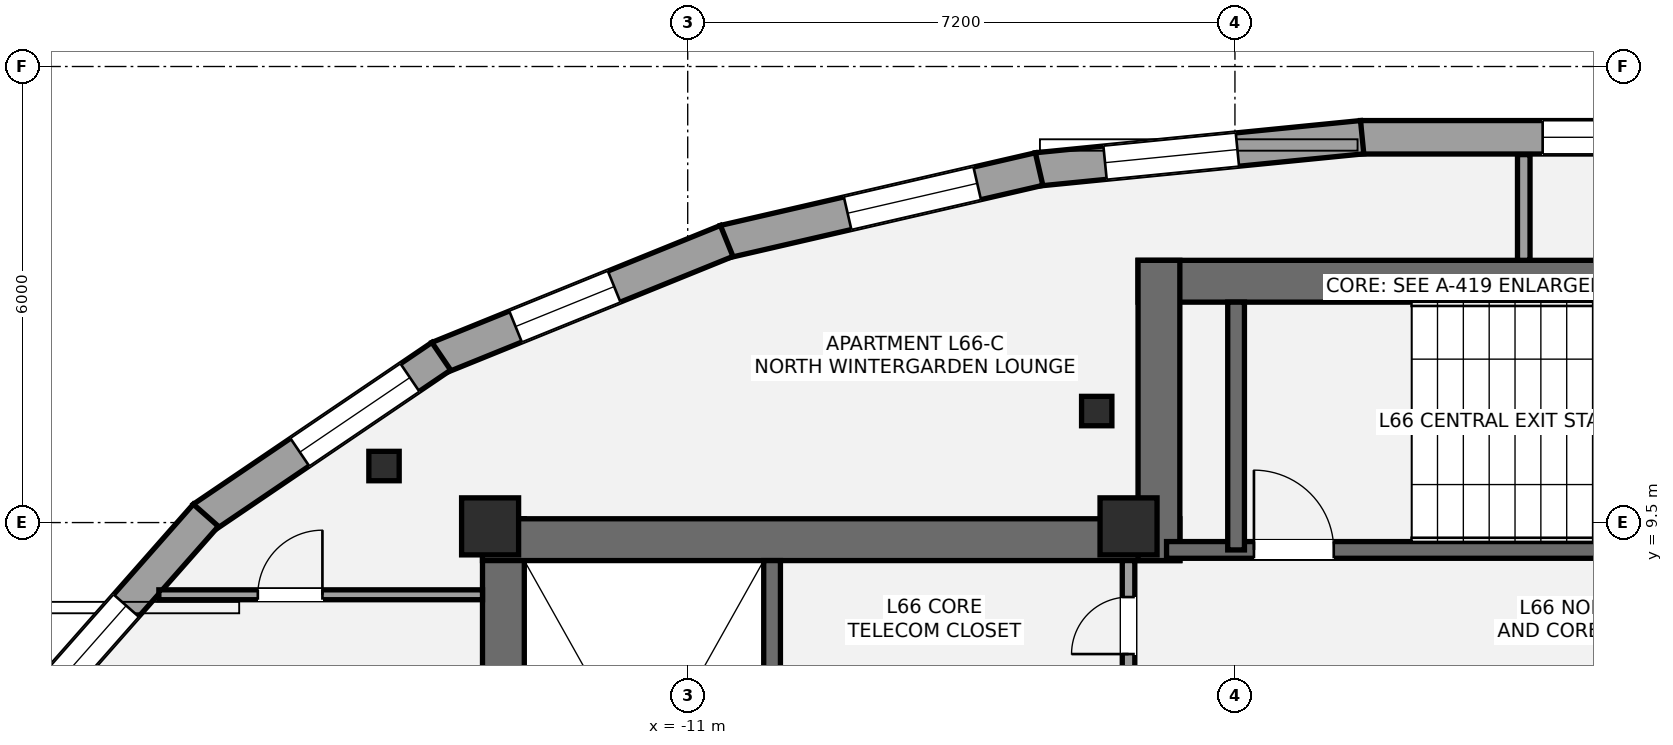
"""IFC4 building model, lengths in metres.
Left out: names, types, materials, properties, quantities, classifications, styles, units other than length and angle.
Written with IfcOpenShell. Run it as: python <this file> out.ifc"""

import sys

from ifc_helpers import new_model, si_unit, direction, frame, frame_2d, origin, origin_2d, place, context, subcontext, project, spatial, rectangle, i_section, extrude, element, fill, save


model = new_model("IFC4")
c1 = context("Model", 3, precision=1e-05, world=origin(), true_north=direction((0.0, 1.0)))
c2 = subcontext(c1, "Body", "Model", "MODEL_VIEW")
j1 = project(units=[si_unit("LENGTHUNIT", "METRE"), si_unit("PLANEANGLEUNIT", "RADIAN")], contexts=[c1])
p1 = place(None, origin())
s1 = spatial("IfcSite", under=j1, at=p1, CompositionType="ELEMENT")
p2 = place(p1, origin())
s2 = spatial("IfcBuilding", under=s1, at=p2, CompositionType="ELEMENT")
p3 = place(p2, frame((0.0, 0.0, 235.2)))
s3 = spatial("IfcBuildingStorey", under=s2, at=p3, CompositionType="ELEMENT", Elevation=235.2)
p4 = place(p3, frame((-13.425, 1.3, 0.0), z_axis=(0.0, 0.0, 1.0), x_axis=(0.0, 1.0, 0.0)))
e1 = element("IfcWall", 1, at=p4, inside=s3, PredefinedType="SHEAR", context=c2, shape_type="SweptSolid", body=[
    extrude(rectangle(XDim=8.25, YDim=0.55, at=frame_2d((4.125, 0.0))), origin(), (0.0, 0.0, 1.0), 3.15),
])
p5 = place(p3, frame((-13.7, 9.275, 0.0), z_axis=(0.0, 0.0, 1.0), x_axis=(1.0, 0.0, 0.0)))
e2 = element("IfcWall", 2, at=p5, inside=s3, PredefinedType="SHEAR", context=c2, shape_type="SweptSolid", body=[
    extrude(rectangle(XDim=9.175, YDim=0.55, at=frame_2d((4.587, 0.0))), origin(), (0.0, 0.0, 1.0), 3.15),
])
p6 = place(p3, frame((-9.89, 1.85, 0.0), z_axis=(0.0, 0.0, 1.0), x_axis=(0.0, 1.0, 0.0)))
e3 = element("IfcWall", 3, at=p6, inside=s3, PredefinedType="SHEAR", context=c2, shape_type="SweptSolid", body=[
    extrude(rectangle(XDim=7.15, YDim=0.22, at=frame_2d((3.575, 0.0))), origin(), (0.0, 0.0, 1.0), 3.15),
])
p7 = place(p3, frame((-5.075, 12.675, 0.0), z_axis=(0.0, 0.0, 1.0), x_axis=(1.0, 0.0, 0.0)))
e4 = element("IfcWall", 4, at=p7, inside=s3, PredefinedType="SHEAR", context=c2, shape_type="SweptSolid", body=[
    extrude(rectangle(XDim=10.15, YDim=0.55, at=frame_2d((5.075, 0.0))), origin(), (0.0, 0.0, 1.0), 3.15),
])
p8 = place(p3, frame((-4.8, 9.0, 0.0), z_axis=(0.0, 0.0, 1.0), x_axis=(0.0, 1.0, 0.0)))
e5 = element("IfcWall", 5, at=p8, inside=s3, PredefinedType="SHEAR", context=c2, shape_type="SweptSolid", body=[
    extrude(rectangle(XDim=3.95, YDim=0.55, at=frame_2d((1.975, 0.0))), origin(), (0.0, 0.0, 1.0), 3.15),
])
p9 = place(p3, frame((-4.7, 9.14, 0.0), z_axis=(0.0, 0.0, 1.0), x_axis=(1.0, 0.0, 0.0)))
e6 = element("IfcWall", 6, at=p9, inside=s3, PredefinedType="SHEAR", context=c2, shape_type="SweptSolid", body=[
    extrude(rectangle(XDim=9.3, YDim=0.22, at=frame_2d((4.65, 0.0))), origin(), (0.0, 0.0, 1.0), 3.15),
])
p10 = place(p9, frame((1.15, 0.0, 0.0)))
e7 = element("IfcOpeningElement", 7, at=p10, cuts=e6, PredefinedType="OPENING", context=c2, shape_type="SweptSolid", body=[
    extrude(rectangle(XDim=1.05, YDim=2.15, at=frame_2d((0.525, 1.075))), frame((0.0, 0.12, 0.0), z_axis=(0.0, -1.0, 0.0), x_axis=(1.0, 0.0, 0.0)), (0.0, 0.0, 1.0), 0.24),
])
p11 = place(p3, frame((-3.785, 9.14, 0.0), z_axis=(0.0, 0.0, 1.0), x_axis=(0.0, 1.0, 0.0)))
e8 = element("IfcWall", 8, at=p11, inside=s3, PredefinedType="SHEAR", context=c2, shape_type="SweptSolid", body=[
    extrude(rectangle(XDim=3.26, YDim=0.22, at=frame_2d((1.63, 0.0))), origin(), (0.0, 0.0, 1.0), 3.15),
])
for number, where, z_axis, x_axis in (
    (9, (-13.6, 9.45, 0.0), (0.0, 0.0, 1.0), (1.0, 0.0, 0.0)),
    (10, (-5.2, 9.45, 0.0), (0.0, 0.0, 1.0), (1.0, 0.0, 0.0)),
):
    element("IfcColumn", number, at=place(p3, frame(where, z_axis=z_axis, x_axis=x_axis)), inside=s3, PredefinedType="PILASTER", context=c2, shape_type="SweptSolid", body=[
        extrude(rectangle(XDim=0.75, YDim=0.75, at=origin_2d()), origin(), (0.0, 0.0, 1.0), 3.15),
    ])
for number, where, z_axis, x_axis in (
    (11, (-5.619, 10.967, 0.0), (0.0, 0.0, 1.0), (1.0, 0.0, 0.0)),
    (12, (-14.996, 10.244, 0.0), (0.0, 0.0, 1.0), (1.0, 0.0, 0.0)),
):
    element("IfcColumn", number, at=place(p3, frame(where, z_axis=z_axis, x_axis=x_axis)), inside=s3, PredefinedType="COLUMN", context=c2, shape_type="SweptSolid", body=[
        extrude(i_section(OverallWidth=0.399, OverallDepth=0.387, WebThickness=0.021, FlangeThickness=0.033, at=origin_2d()), origin(), (0.0, 0.0, 1.0), 3.15),
    ])
p12 = place(p3, frame((-2.148, 14.569, 0.0), z_axis=(0.0, 0.0, 1.0), x_axis=(1.0, 0.0, 0.0)))
e13 = element("IfcWall", 13, at=p12, inside=s3, PredefinedType="STANDARD", context=c2, shape_type="SweptSolid", body=[
    extrude(rectangle(XDim=4.296, YDim=0.44, at=frame_2d((2.148, 0.0))), origin(), (0.0, 0.0, 1.0), 2.336),
])
p13 = place(p12, frame((2.396, 0.0, 0.58)))
e14 = element("IfcOpeningElement", 14, at=p13, cuts=e13, PredefinedType="OPENING", context=c2, shape_type="SweptSolid", body=[
    extrude(rectangle(XDim=1.4, YDim=1.55, at=frame_2d((0.7, 0.775))), frame((0.0, 0.23, 0.0), z_axis=(0.0, -1.0, 0.0), x_axis=(1.0, 0.0, 0.0)), (0.0, 0.0, 1.0), 0.46),
])
p14 = place(p3, frame((-6.405, 14.146, 0.0), z_axis=(0.0, 0.0, 1.0), x_axis=(0.995134540264, 0.098525361068, 0.0)))
e15 = element("IfcWall", 15, at=p14, inside=s3, PredefinedType="STANDARD", context=c2, shape_type="SweptSolid", body=[
    extrude(rectangle(XDim=4.299, YDim=0.44, at=frame_2d((2.15, 0.0))), origin(), (0.0, 0.0, 1.0), 2.336),
])
p15 = place(p14, frame((0.9, 0.0, 0.55)))
e16 = element("IfcOpeningElement", 16, at=p15, cuts=e15, PredefinedType="OPENING", context=c2, shape_type="SweptSolid", body=[
    extrude(rectangle(XDim=1.75, YDim=1.55, at=frame_2d((0.875, 0.775))), frame((0.0, 0.23, 0.0), z_axis=(0.0, -1.0, 0.0), x_axis=(1.0, 0.0, 0.0)), (0.0, 0.0, 1.0), 0.46),
])
p16 = place(p3, frame((-10.52, 13.195, 0.0), z_axis=(0.0, 0.0, 1.0), x_axis=(0.974398936081, 0.224825962391, 0.0)))
e17 = element("IfcWall", 17, at=p16, inside=s3, PredefinedType="STANDARD", context=c2, shape_type="SweptSolid", body=[
    extrude(rectangle(XDim=4.252, YDim=0.44, at=frame_2d((2.126, 0.0))), origin(), (0.0, 0.0, 1.0), 2.336),
])
p17 = place(p16, frame((1.667, 0.0, 0.55)))
e18 = element("IfcOpeningElement", 18, at=p17, cuts=e17, PredefinedType="OPENING", context=c2, shape_type="SweptSolid", body=[
    extrude(rectangle(XDim=1.75, YDim=1.55, at=frame_2d((0.875, 0.775))), frame((0.0, 0.23, 0.0), z_axis=(0.0, -1.0, 0.0), x_axis=(1.0, 0.0, 0.0)), (0.0, 0.0, 1.0), 0.46),
])
p18 = place(p3, frame((-14.283, 11.666, 0.0), z_axis=(0.0, 0.0, 1.0), x_axis=(0.926731976866, 0.375723093586, 0.0)))
e19 = element("IfcWall", 19, at=p18, inside=s3, PredefinedType="STANDARD", context=c2, shape_type="SweptSolid", body=[
    extrude(rectangle(XDim=4.096, YDim=0.44, at=frame_2d((2.048, 0.0))), origin(), (0.0, 0.0, 1.0), 2.336),
])
p19 = place(p18, frame((1.098, 0.0, 0.55)))
e20 = element("IfcOpeningElement", 20, at=p19, cuts=e19, PredefinedType="OPENING", context=c2, shape_type="SweptSolid", body=[
    extrude(rectangle(XDim=1.4, YDim=1.55, at=frame_2d((0.7, 0.775))), frame((0.0, 0.23, 0.0), z_axis=(0.0, -1.0, 0.0), x_axis=(1.0, 0.0, 0.0)), (0.0, 0.0, 1.0), 0.46),
])
p20 = place(p3, frame((-17.381, 9.559, 0.0), z_axis=(0.0, 0.0, 1.0), x_axis=(0.827637036896, 0.561263694851, 0.0)))
e21 = element("IfcWall", 21, at=p20, inside=s3, PredefinedType="STANDARD", context=c2, shape_type="SweptSolid", body=[
    extrude(rectangle(XDim=3.793, YDim=0.44, at=frame_2d((1.896, 0.0))), origin(), (0.0, 0.0, 1.0), 2.336),
])
p21 = place(p20, frame((1.544, 0.0, 0.55)))
e22 = element("IfcOpeningElement", 22, at=p21, cuts=e21, PredefinedType="OPENING", context=c2, shape_type="SweptSolid", body=[
    extrude(rectangle(XDim=1.75, YDim=1.55, at=frame_2d((0.875, 0.775))), frame((0.0, 0.23, 0.0), z_axis=(0.0, -1.0, 0.0), x_axis=(1.0, 0.0, 0.0)), (0.0, 0.0, 1.0), 0.46),
])
p22 = place(p3, frame((-19.61, 7.022, 0.0), z_axis=(0.0, 0.0, 1.0), x_axis=(0.66136043846, 0.750068243855, 0.0)))
e23 = element("IfcWall", 23, at=p22, inside=s3, PredefinedType="STANDARD", context=c2, shape_type="SweptSolid", body=[
    extrude(rectangle(XDim=3.432, YDim=0.44, at=frame_2d((1.716, 0.0))), origin(), (0.0, 0.0, 1.0), 2.336),
])
p23 = place(p22, frame((0.447, 0.0, 0.58)))
e24 = element("IfcOpeningElement", 24, at=p23, cuts=e23, PredefinedType="OPENING", context=c2, shape_type="SweptSolid", body=[
    extrude(rectangle(XDim=1.4, YDim=1.55, at=frame_2d((0.7, 0.775))), frame((0.0, 0.23, 0.0), z_axis=(0.0, -1.0, 0.0), x_axis=(1.0, 0.0, 0.0)), (0.0, 0.0, 1.0), 0.46),
])
p24 = place(p3, frame((-5.2, 7.42, 0.0), z_axis=(0.0, 0.0, 1.0), x_axis=(0.0, 1.0, 0.0)))
e25 = element("IfcWall", 25, at=p24, inside=s3, PredefinedType="PARTITIONING", context=c2, shape_type="SweptSolid", body=[
    extrude(rectangle(XDim=1.58, YDim=0.165, at=frame_2d((0.79, 0.0))), origin(), (0.0, 0.0, 1.0), 2.97),
])
p25 = place(p24, frame((0.35, 0.0, 0.0)))
e26 = element("IfcOpeningElement", 26, at=p25, cuts=e25, PredefinedType="OPENING", context=c2, shape_type="SweptSolid", body=[
    extrude(rectangle(XDim=0.75, YDim=2.1, at=frame_2d((0.375, 1.05))), frame((0.0, 0.093, 0.0), z_axis=(0.0, -1.0, 0.0), x_axis=(1.0, 0.0, 0.0)), (0.0, 0.0, 1.0), 0.185),
])
p26 = place(p3, frame((0.0, 12.95, 0.0), z_axis=(0.0, 0.0, 1.0), x_axis=(0.0, 1.0, 0.0)))
e27 = element("IfcWall", 27, at=p26, inside=s3, PredefinedType="PARTITIONING", context=c2, shape_type="SweptSolid", body=[
    extrude(rectangle(XDim=1.391, YDim=0.165, at=frame_2d((0.695, 0.0))), origin(), (0.0, 0.0, 1.0), 2.97),
])
p27 = place(p3, frame((-17.958, 8.55, 0.0), z_axis=(0.0, 0.0, 1.0), x_axis=(1.0, 0.0, 0.0)))
e28 = element("IfcWall", 28, at=p27, inside=s3, PredefinedType="PARTITIONING", context=c2, shape_type="SweptSolid", body=[
    extrude(rectangle(XDim=4.258, YDim=0.13, at=frame_2d((2.129, 0.0))), origin(), (0.0, 0.0, 1.0), 2.423),
])
p28 = place(p27, frame((1.302, 0.0, 0.0)))
e29 = element("IfcOpeningElement", 29, at=p28, cuts=e28, PredefinedType="OPENING", context=c2, shape_type="SweptSolid", body=[
    extrude(rectangle(XDim=0.85, YDim=2.1, at=frame_2d((0.425, 1.05))), frame((0.0, 0.075, 0.0), z_axis=(0.0, -1.0, 0.0), x_axis=(1.0, 0.0, 0.0)), (0.0, 0.0, 1.0), 0.15),
])
p29 = place(p13, origin())
e30 = element("IfcWindow", 30, at=p29, inside=s3, PartitioningType="SINGLE_PANEL", PredefinedType="WINDOW", context=c2, shape_type="SweptSolid", body=[
    extrude(rectangle(XDim=1.4, YDim=1.55, at=frame_2d((0.7, 0.775))), frame((0.0, -0.01, 0.0), z_axis=(0.0, -1.0, 0.0), x_axis=(1.0, 0.0, 0.0)), (0.0, 0.0, 1.0), 0.06),
])
fill(e14, e30)
p30 = place(p15, origin())
e31 = element("IfcWindow", 31, at=p30, inside=s3, PartitioningType="SINGLE_PANEL", PredefinedType="WINDOW", context=c2, shape_type="SweptSolid", body=[
    extrude(rectangle(XDim=1.75, YDim=1.55, at=frame_2d((0.875, 0.775))), frame((0.0, -0.01, 0.0), z_axis=(0.0, -1.0, 0.0), x_axis=(1.0, 0.0, 0.0)), (0.0, 0.0, 1.0), 0.06),
])
fill(e16, e31)
p31 = place(p17, origin())
e32 = element("IfcWindow", 32, at=p31, inside=s3, PartitioningType="SINGLE_PANEL", PredefinedType="WINDOW", context=c2, shape_type="SweptSolid", body=[
    extrude(rectangle(XDim=1.75, YDim=1.55, at=frame_2d((0.875, 0.775))), frame((0.0, -0.01, 0.0), z_axis=(0.0, -1.0, 0.0), x_axis=(1.0, 0.0, 0.0)), (0.0, 0.0, 1.0), 0.06),
])
fill(e18, e32)
p32 = place(p19, origin())
e33 = element("IfcWindow", 33, at=p32, inside=s3, PartitioningType="SINGLE_PANEL", PredefinedType="WINDOW", context=c2, shape_type="SweptSolid", body=[
    extrude(rectangle(XDim=1.4, YDim=1.55, at=frame_2d((0.7, 0.775))), frame((0.0, -0.01, 0.0), z_axis=(0.0, -1.0, 0.0), x_axis=(1.0, 0.0, 0.0)), (0.0, 0.0, 1.0), 0.06),
])
fill(e20, e33)
p33 = place(p21, origin())
e34 = element("IfcWindow", 34, at=p33, inside=s3, PartitioningType="SINGLE_PANEL", PredefinedType="WINDOW", context=c2, shape_type="SweptSolid", body=[
    extrude(rectangle(XDim=1.75, YDim=1.55, at=frame_2d((0.875, 0.775))), frame((0.0, -0.01, 0.0), z_axis=(0.0, -1.0, 0.0), x_axis=(1.0, 0.0, 0.0)), (0.0, 0.0, 1.0), 0.06),
])
fill(e22, e34)
p34 = place(p23, origin())
e35 = element("IfcWindow", 35, at=p34, inside=s3, PartitioningType="SINGLE_PANEL", PredefinedType="WINDOW", context=c2, shape_type="SweptSolid", body=[
    extrude(rectangle(XDim=1.4, YDim=1.55, at=frame_2d((0.7, 0.775))), frame((0.0, -0.01, 0.0), z_axis=(0.0, -1.0, 0.0), x_axis=(1.0, 0.0, 0.0)), (0.0, 0.0, 1.0), 0.06),
])
fill(e24, e35)
p35 = place(p10, origin())
e36 = element("IfcDoor", 36, at=p35, inside=s3, OperationType="SINGLE_SWING_LEFT", PredefinedType="DOOR", context=c2, shape_type="SweptSolid", body=[
    extrude(rectangle(XDim=1.05, YDim=2.15, at=frame_2d((0.525, 1.075))), frame((0.0, 0.025, 0.0), z_axis=(0.0, -1.0, 0.0), x_axis=(1.0, 0.0, 0.0)), (0.0, 0.0, 1.0), 0.05),
])
fill(e7, e36)
p36 = place(p25, origin())
e37 = element("IfcDoor", 37, at=p36, inside=s3, OperationType="SINGLE_SWING_LEFT", PredefinedType="DOOR", context=c2, shape_type="SweptSolid", body=[
    extrude(rectangle(XDim=0.75, YDim=2.1, at=frame_2d((0.375, 1.05))), frame((0.0, 0.025, 0.0), z_axis=(0.0, -1.0, 0.0), x_axis=(1.0, 0.0, 0.0)), (0.0, 0.0, 1.0), 0.05),
])
fill(e26, e37)
p37 = place(p28, origin())
e38 = element("IfcDoor", 38, at=p37, inside=s3, OperationType="SINGLE_SWING_RIGHT", PredefinedType="DOOR", context=c2, shape_type="SweptSolid", body=[
    extrude(rectangle(XDim=0.85, YDim=2.1, at=frame_2d((0.425, 1.05))), frame((0.0, 0.025, 0.0), z_axis=(0.0, -1.0, 0.0), x_axis=(1.0, 0.0, 0.0)), (0.0, 0.0, 1.0), 0.05),
])
fill(e29, e38)
save(model, sys.argv[1])
